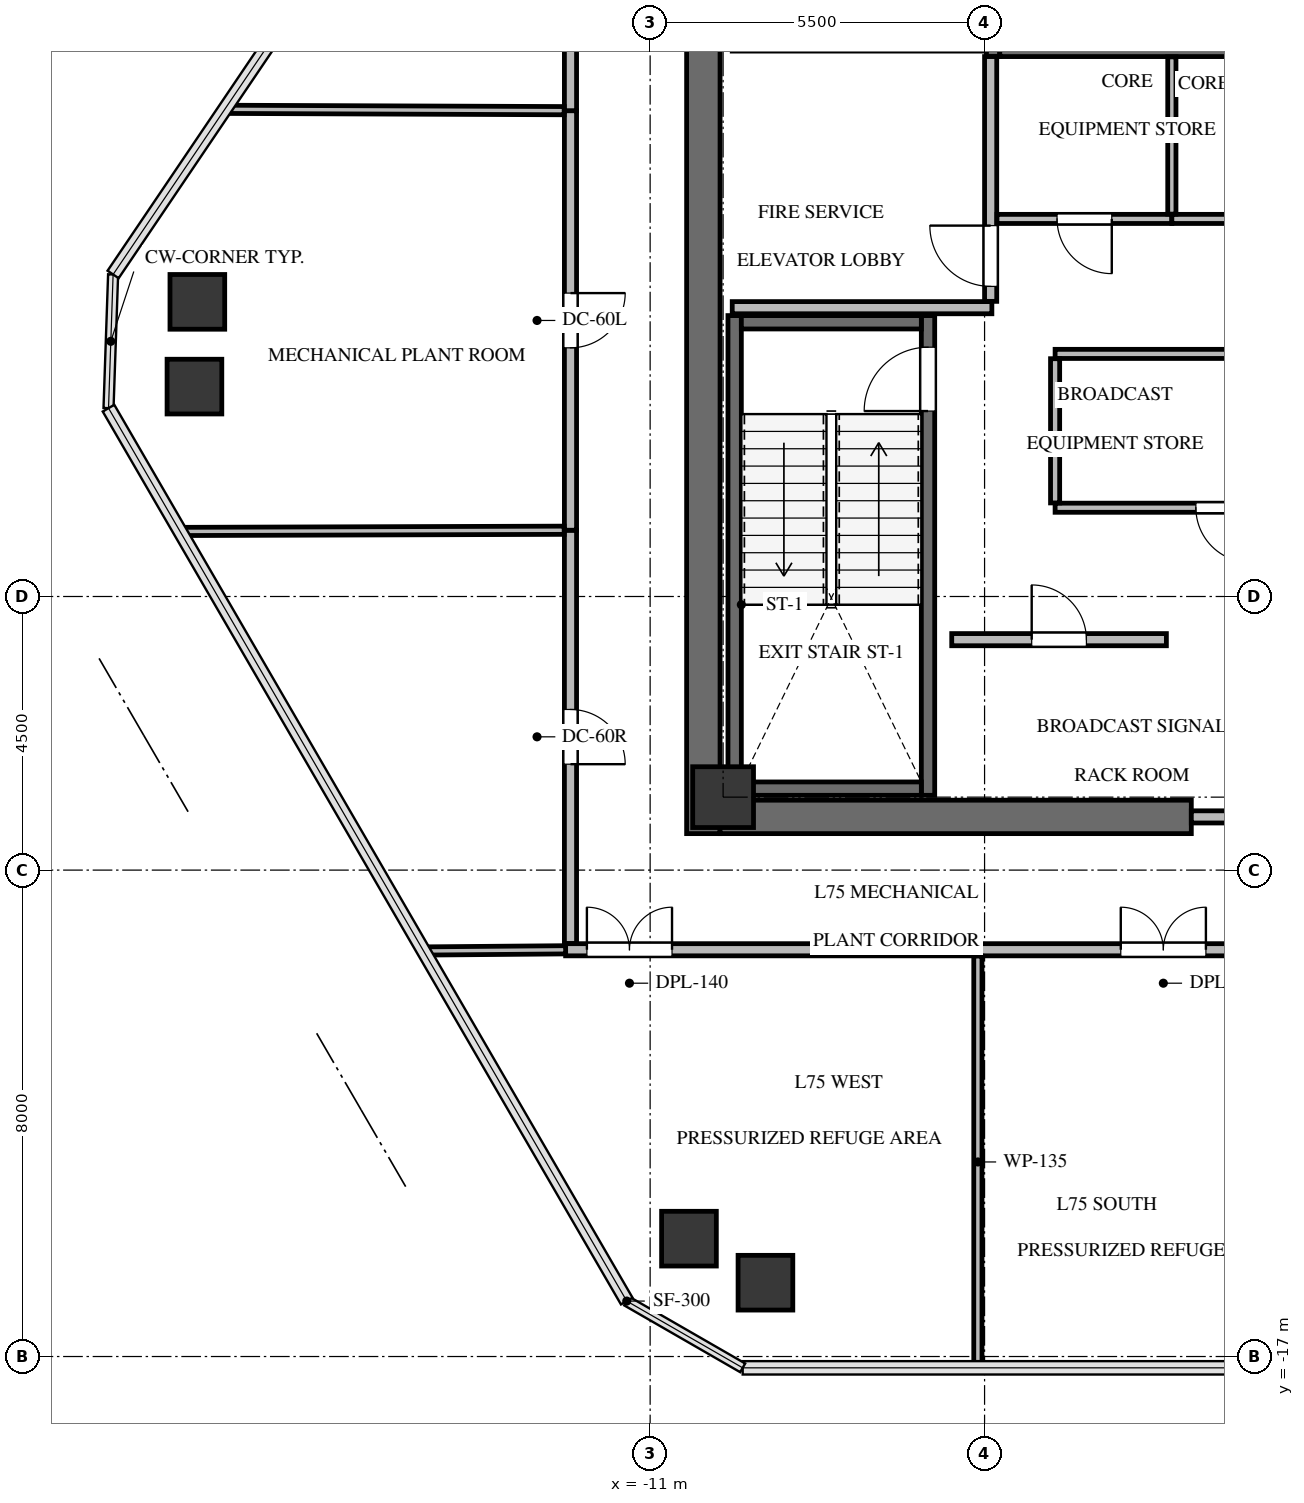
"""IFC4 building model, lengths in metres.
Left out: names, types, materials, properties, quantities, classifications, styles, units other than length and angle.
Written with IfcOpenShell. Run it as: python <this file> out.ifc"""

import sys

from ifc_helpers import new_model, si_unit, direction, frame, frame_2d, origin, origin_2d, place, context, subcontext, project, spatial, rectangle, extrude, source, transform, mapped, element, fill, save


model = new_model("IFC4")
c1 = context("Model", 3, precision=1e-05, world=origin(), true_north=direction((0.0, 1.0)))
c2 = subcontext(c1, "Body", "Model", "MODEL_VIEW")
j1 = project(units=[si_unit("LENGTHUNIT", "METRE"), si_unit("PLANEANGLEUNIT", "RADIAN")], contexts=[c1])
p1 = place(None, origin())
s1 = spatial("IfcSite", under=j1, at=p1, CompositionType="ELEMENT")
p2 = place(p1, origin())
s2 = spatial("IfcBuilding", under=s1, at=p2, CompositionType="ELEMENT")
p3 = place(p2, frame((0.0, 0.0, 268.3)))
s3 = spatial("IfcBuildingStorey", under=s2, at=p3, CompositionType="ELEMENT", Elevation=268.3)
p4 = place(p3, frame((-10.125, -8.4, 0.0), z_axis=(0.0, 0.0, 1.0), x_axis=(0.0, 1.0, 0.0)))
e1 = element("IfcWall", 1, at=p4, inside=s3, PredefinedType="SHEAR", context=c2, shape_type="SweptSolid", body=[
    extrude(rectangle(XDim=16.8, YDim=0.55, at=frame_2d((8.4, 0.0))), origin(), (0.0, 0.0, 1.0), 4.2),
])
p5 = place(p3, frame((-9.85, -8.125, 0.0), z_axis=(0.0, 0.0, 1.0), x_axis=(1.0, 0.0, 0.0)))
e2 = element("IfcWall", 2, at=p5, inside=s3, PredefinedType="SHEAR", context=c2, shape_type="SweptSolid", body=[
    extrude(rectangle(XDim=7.75, YDim=0.55, at=frame_2d((3.875, 0.0))), origin(), (0.0, 0.0, 1.0), 4.2),
])
p6 = place(p3, frame((-6.43, -7.77, -0.3), z_axis=(0.0, 0.0, 1.0), x_axis=(0.0, 1.0, 0.0)))
e3 = element("IfcWall", 3, at=p6, inside=s3, PredefinedType="SHEAR", context=c2, shape_type="SweptSolid", body=[
    extrude(rectangle(XDim=7.89, YDim=0.22, at=frame_2d((3.945, 0.0))), origin(), (0.0, 0.0, 1.0), 4.05),
])
p7 = place(p6, frame((6.32, 0.0, 0.0)))
e4 = element("IfcOpeningElement", 4, at=p7, cuts=e3, PredefinedType="OPENING", context=c2, shape_type="SweptSolid", body=[
    extrude(rectangle(XDim=1.05, YDim=2.15, at=frame_2d((0.525, 1.075))), frame((0.0, 0.12, 0.0), z_axis=(0.0, -1.0, 0.0), x_axis=(1.0, 0.0, 0.0)), (0.0, 0.0, 1.0), 0.24),
])
p8 = place(p3, frame((-9.61, 0.12, -0.3), z_axis=(0.0, 0.0, 1.0), x_axis=(0.0, -1.0, 0.0)))
e5 = element("IfcWall", 5, at=p8, inside=s3, PredefinedType="SHEAR", context=c2, shape_type="SweptSolid", body=[
    extrude(rectangle(XDim=7.89, YDim=0.22, at=frame_2d((3.945, 0.0))), origin(), (0.0, 0.0, 1.0), 4.05),
])
for number, where, z_axis, x_axis in (
    (6, (-9.5, -7.66, -0.3), (0.0, 0.0, 1.0), (1.0, 0.0, 0.0)),
    (7, (-6.54, 0.01, -0.3), (0.0, 0.0, 1.0), (-1.0, 0.0, 0.0)),
):
    element("IfcWall", number, at=place(p3, frame(where, z_axis=z_axis, x_axis=x_axis)), inside=s3, PredefinedType="SHEAR", context=c2, shape_type="SweptSolid", body=[
        extrude(rectangle(XDim=2.96, YDim=0.22, at=frame_2d((1.48, 0.0))), origin(), (0.0, 0.0, 1.0), 4.05),
    ])
p9 = place(p3, frame((-5.36, 7.78, -0.3), z_axis=(0.0, 0.0, 1.0), x_axis=(0.0, -1.0, 0.0)))
e8 = element("IfcWall", 8, at=p9, inside=s3, PredefinedType="SHEAR", context=c2, shape_type="SweptSolid", body=[
    extrude(rectangle(XDim=3.4, YDim=0.22, at=frame_2d((1.7, 0.0))), origin(), (0.0, 0.0, 1.0), 4.05),
])
p10 = place(p3, frame((-5.25, 4.49, -0.3), z_axis=(0.0, 0.0, 1.0), x_axis=(1.0, 0.0, 0.0)))
e9 = element("IfcWall", 9, at=p10, inside=s3, PredefinedType="SHEAR", context=c2, shape_type="SweptSolid", body=[
    extrude(rectangle(XDim=7.35, YDim=0.22, at=frame_2d((3.675, 0.0))), origin(), (0.0, 0.0, 1.0), 4.05),
])
p11 = place(p10, frame((5.85, 0.0, 0.0)))
e10 = element("IfcOpeningElement", 10, at=p11, cuts=e9, PredefinedType="OPENING", context=c2, shape_type="SweptSolid", body=[
    extrude(rectangle(XDim=1.05, YDim=2.15, at=frame_2d((0.525, 1.075))), frame((0.0, 0.12, 0.0), z_axis=(0.0, -1.0, 0.0), x_axis=(1.0, 0.0, 0.0)), (0.0, 0.0, 1.0), 0.24),
])
m1 = source(origin(), c2, "Body", "SweptSolid", [
    extrude(rectangle(XDim=1.0, YDim=1.0, at=origin_2d()), origin(), (0.0, 0.0, 1.0), 4.05),
])
p12 = place(p3, frame((-9.8, -7.8, -0.3), z_axis=(0.0, 0.0, 1.0), x_axis=(1.0, 0.0, 0.0)))
e11 = element("IfcColumn", 11, at=p12, inside=s3, PredefinedType="COLUMN", context=c2, shape_type="MappedRepresentation", body=[
    mapped(m1, transform((0.0, 0.0, 0.0), x_axis=(1.0, 0.0, 0.0), y_axis=(0.0, 1.0, 0.0), z_axis=(0.0, 0.0, 1.0), scale=1.0)),
])
m2 = source(origin(), c2, "Body", "SweptSolid", [
    extrude(rectangle(XDim=0.9, YDim=0.9, at=origin_2d()), origin(), (0.0, 0.0, 1.0), 4.05),
])
for number, where, z_axis, x_axis in (
    (12, (-10.361, -15.062, -0.3), (0.0, 0.0, 1.0), (1.0, 0.0, 0.0)),
    (13, (-18.494, -1.048, -0.3), (0.0, 0.0, 1.0), (1.0, 0.0, 0.0)),
    (14, (-18.446, 0.346, -0.3), (0.0, 0.0, 1.0), (1.0, 0.0, 0.0)),
    (15, (-9.104, -15.786, -0.3), (0.0, 0.0, 1.0), (1.0, 0.0, 0.0)),
):
    element("IfcColumn", number, at=place(p3, frame(where, z_axis=z_axis, x_axis=x_axis)), inside=s3, PredefinedType="COLUMN", context=c2, shape_type="MappedRepresentation", body=[
        mapped(m2, transform((0.0, 0.0, 0.0), x_axis=(1.0, 0.0, 0.0), y_axis=(0.0, 1.0, 0.0), z_axis=(0.0, 0.0, 1.0), scale=1.0)),
    ])
p13 = place(p3, frame((-2.1, -8.125, 0.0), z_axis=(0.0, 0.0, 1.0), x_axis=(1.0, 0.0, 0.0)))
e16 = element("IfcWall", 16, at=p13, inside=s3, PredefinedType="SOLIDWALL", context=c2, shape_type="SweptSolid", body=[
    extrude(rectangle(XDim=4.2, YDim=0.2, at=frame_2d((2.1, 0.0))), origin(), (0.0, 0.0, 1.0), 3.735),
])
p14 = place(p13, frame((1.2, 0.0, 0.0)))
e17 = element("IfcOpeningElement", 17, at=p14, cuts=e16, PredefinedType="OPENING", context=c2, shape_type="SweptSolid", body=[
    extrude(rectangle(XDim=1.8, YDim=2.15, at=frame_2d((0.9, 1.075))), frame((0.0, 0.11, 0.0), z_axis=(0.0, -1.0, 0.0), x_axis=(1.0, 0.0, 0.0)), (0.0, 0.0, 1.0), 0.22),
])
p15 = place(p3, frame((-9.65, 0.25, 0.0), z_axis=(0.0, 0.0, 1.0), x_axis=(1.0, 0.0, 0.0)))
e18 = element("IfcWall", 18, at=p15, inside=s3, PredefinedType="SOLIDWALL", context=c2, shape_type="SweptSolid", body=[
    extrude(rectangle(XDim=4.27, YDim=0.2, at=frame_2d((2.135, 0.0))), origin(), (0.0, 0.0, 1.0), 3.735),
])
p16 = place(p3, frame((-5.4, 0.354, 0.0), z_axis=(0.0, 0.0, 1.0), x_axis=(0.0, 1.0, 0.0)))
e19 = element("IfcWall", 19, at=p16, inside=s3, PredefinedType="SOLIDWALL", context=c2, shape_type="SweptSolid", body=[
    extrude(rectangle(XDim=4.026, YDim=0.2, at=frame_2d((2.013, 0.0))), origin(), (0.0, 0.0, 1.0), 3.735),
])
p17 = place(p16, frame((0.246, 0.0, 0.0)))
e20 = element("IfcOpeningElement", 20, at=p17, cuts=e19, PredefinedType="OPENING", context=c2, shape_type="SweptSolid", body=[
    extrude(rectangle(XDim=1.0, YDim=2.15, at=frame_2d((0.5, 1.075))), frame((0.0, 0.11, 0.0), z_axis=(0.0, -1.0, 0.0), x_axis=(1.0, 0.0, 0.0)), (0.0, 0.0, 1.0), 0.22),
])
p18 = place(p3, frame((-6.04, -5.21, 0.0), z_axis=(0.0, 0.0, 1.0), x_axis=(1.0, 0.0, 0.0)))
e21 = element("IfcWall", 21, at=p18, inside=s3, PredefinedType="SOLIDWALL", context=c2, shape_type="SweptSolid", body=[
    extrude(rectangle(XDim=3.53, YDim=0.2, at=frame_2d((1.765, 0.0))), origin(), (0.0, 0.0, 1.0), 3.735),
])
p19 = place(p18, frame((1.315, 0.0, 0.0)))
e22 = element("IfcOpeningElement", 22, at=p19, cuts=e21, PredefinedType="OPENING", context=c2, shape_type="SweptSolid", body=[
    extrude(rectangle(XDim=0.9, YDim=2.05, at=frame_2d((0.45, 1.025))), frame((0.0, 0.11, 0.0), z_axis=(0.0, -1.0, 0.0), x_axis=(1.0, 0.0, 0.0)), (0.0, 0.0, 1.0), 0.22),
])
p20 = place(p3, frame((1.19, -3.04, 0.0), z_axis=(0.0, 0.0, 1.0), x_axis=(-1.0, 0.0, 0.0)))
e23 = element("IfcWall", 23, at=p20, inside=s3, PredefinedType="PARTITIONING", context=c2, shape_type="SweptSolid", body=[
    extrude(rectangle(XDim=5.53, YDim=0.15, at=frame_2d((2.765, 0.0))), origin(), (0.0, 0.0, 1.0), 3.735),
])
p21 = place(p20, frame((2.315, 0.0, 0.0)))
e24 = element("IfcOpeningElement", 24, at=p21, cuts=e23, PredefinedType="OPENING", context=c2, shape_type="SweptSolid", body=[
    extrude(rectangle(XDim=0.9, YDim=2.05, at=frame_2d((0.45, 1.025))), frame((0.0, 0.085, 0.0), z_axis=(0.0, -1.0, 0.0), x_axis=(1.0, 0.0, 0.0)), (0.0, 0.0, 1.0), 0.17),
])
p22 = place(p3, frame((-4.34, -0.51, 0.0), z_axis=(0.0, 0.0, 1.0), x_axis=(1.0, 0.0, 0.0)))
e25 = element("IfcWall", 25, at=p22, inside=s3, PredefinedType="PARTITIONING", context=c2, shape_type="SweptSolid", body=[
    extrude(rectangle(XDim=5.53, YDim=0.15, at=frame_2d((2.765, 0.0))), origin(), (0.0, 0.0, 1.0), 3.735),
])
p23 = place(p3, frame((-4.34, -2.961, 0.0), z_axis=(0.0, 0.0, 1.0), x_axis=(0.0, 1.0, 0.0)))
e26 = element("IfcWall", 26, at=p23, inside=s3, PredefinedType="PARTITIONING", context=c2, shape_type="SweptSolid", body=[
    extrude(rectangle(XDim=2.372, YDim=0.15, at=frame_2d((1.186, 0.0))), origin(), (0.0, 0.0, 1.0), 3.735),
])
p24 = place(p3, frame((-2.42, 1.71, 0.0), z_axis=(0.0, 0.0, 1.0), x_axis=(-1.0, 0.0, 0.0)))
e27 = element("IfcWall", 27, at=p24, inside=s3, PredefinedType="PARTITIONING", context=c2, shape_type="SweptSolid", body=[
    extrude(rectangle(XDim=2.876, YDim=0.15, at=frame_2d((1.438, 0.0))), origin(), (0.0, 0.0, 1.0), 3.735),
])
p25 = place(p24, frame((0.988, 0.0, 0.0)))
e28 = element("IfcOpeningElement", 28, at=p25, cuts=e27, PredefinedType="OPENING", context=c2, shape_type="SweptSolid", body=[
    extrude(rectangle(XDim=0.9, YDim=2.05, at=frame_2d((0.45, 1.025))), frame((0.0, 0.085, 0.0), z_axis=(0.0, -1.0, 0.0), x_axis=(1.0, 0.0, 0.0)), (0.0, 0.0, 1.0), 0.17),
])
p26 = place(p3, frame((0.52, 1.71, 0.0), z_axis=(0.0, 0.0, 1.0), x_axis=(-1.0, 0.0, 0.0)))
e29 = element("IfcWall", 29, at=p26, inside=s3, PredefinedType="PARTITIONING", context=c2, shape_type="SweptSolid", body=[
    extrude(rectangle(XDim=2.94, YDim=0.15, at=frame_2d((1.47, 0.0))), origin(), (0.0, 0.0, 1.0), 3.735),
])
p27 = place(p26, frame((1.02, 0.0, 0.0)))
e30 = element("IfcOpeningElement", 30, at=p27, cuts=e29, PredefinedType="OPENING", context=c2, shape_type="SweptSolid", body=[
    extrude(rectangle(XDim=0.9, YDim=2.05, at=frame_2d((0.45, 1.025))), frame((0.0, 0.085, 0.0), z_axis=(0.0, -1.0, 0.0), x_axis=(1.0, 0.0, 0.0)), (0.0, 0.0, 1.0), 0.17),
])
p28 = place(p3, frame((-12.39, -10.31, 0.0), z_axis=(0.0, 0.0, 1.0), x_axis=(1.0, 0.0, 0.0)))
e31 = element("IfcWall", 31, at=p28, inside=s3, PredefinedType="SOLIDWALL", context=c2, shape_type="SweptSolid", body=[
    extrude(rectangle(XDim=6.78, YDim=0.2, at=frame_2d((3.39, 0.0))), origin(), (0.0, 0.0, 1.0), 3.093),
])
p29 = place(p28, frame((0.35, 0.0, 0.0)))
e32 = element("IfcOpeningElement", 32, at=p29, cuts=e31, PredefinedType="OPENING", context=c2, shape_type="SweptSolid", body=[
    extrude(rectangle(XDim=1.4, YDim=2.15, at=frame_2d((0.7, 1.075))), frame((0.0, 0.11, 0.0), z_axis=(0.0, -1.0, 0.0), x_axis=(1.0, 0.0, 0.0)), (0.0, 0.0, 1.0), 0.22),
])
p30 = place(p3, frame((-5.61, -10.31, 0.0), z_axis=(0.0, 0.0, 1.0), x_axis=(1.0, 0.0, 0.0)))
e33 = element("IfcWall", 33, at=p30, inside=s3, PredefinedType="SOLIDWALL", context=c2, shape_type="SweptSolid", body=[
    extrude(rectangle(XDim=6.1, YDim=0.2, at=frame_2d((3.05, 0.0))), origin(), (0.0, 0.0, 1.0), 2.32),
])
p31 = place(p30, frame((2.35, 0.0, 0.0)))
e34 = element("IfcOpeningElement", 34, at=p31, cuts=e33, PredefinedType="OPENING", context=c2, shape_type="SweptSolid", body=[
    extrude(rectangle(XDim=1.4, YDim=2.15, at=frame_2d((0.7, 1.075))), frame((0.0, 0.11, 0.0), z_axis=(0.0, -1.0, 0.0), x_axis=(1.0, 0.0, 0.0)), (0.0, 0.0, 1.0), 0.22),
])
p32 = place(p3, frame((-12.31, -3.41, 0.0), z_axis=(0.0, 0.0, 1.0), x_axis=(0.0, -1.0, 0.0)))
e35 = element("IfcWall", 35, at=p32, inside=s3, PredefinedType="SOLIDWALL", context=c2, shape_type="SweptSolid", body=[
    extrude(rectangle(XDim=6.796, YDim=0.2, at=frame_2d((3.398, 0.0))), origin(), (0.0, 0.0, 1.0), 3.093),
])
p33 = place(p32, frame((2.948, 0.0, 0.0)))
e36 = element("IfcOpeningElement", 36, at=p33, cuts=e35, PredefinedType="OPENING", context=c2, shape_type="SweptSolid", body=[
    extrude(rectangle(XDim=0.9, YDim=2.05, at=frame_2d((0.45, 1.025))), frame((0.0, 0.11, 0.0), z_axis=(0.0, -1.0, 0.0), x_axis=(1.0, 0.0, 0.0)), (0.0, 0.0, 1.0), 0.22),
])
p34 = place(p3, frame((-12.31, 3.49, 0.0), z_axis=(0.0, 0.0, 1.0), x_axis=(0.0, -1.0, 0.0)))
e37 = element("IfcWall", 37, at=p34, inside=s3, PredefinedType="SOLIDWALL", context=c2, shape_type="SweptSolid", body=[
    extrude(rectangle(XDim=6.9, YDim=0.2, at=frame_2d((3.45, 0.0))), origin(), (0.0, 0.0, 1.0), 3.093),
])
p35 = place(p34, frame((3.0, 0.0, 0.0)))
e38 = element("IfcOpeningElement", 38, at=p35, cuts=e37, PredefinedType="OPENING", context=c2, shape_type="SweptSolid", body=[
    extrude(rectangle(XDim=0.9, YDim=2.05, at=frame_2d((0.45, 1.025))), frame((0.0, 0.11, 0.0), z_axis=(0.0, -1.0, 0.0), x_axis=(1.0, 0.0, 0.0)), (0.0, 0.0, 1.0), 0.22),
])
p36 = place(p3, frame((-12.31, 10.206, 0.0), z_axis=(0.0, 0.0, 1.0), x_axis=(0.0, -1.0, 0.0)))
e39 = element("IfcWall", 39, at=p36, inside=s3, PredefinedType="SOLIDWALL", context=c2, shape_type="SweptSolid", body=[
    extrude(rectangle(XDim=6.716, YDim=0.2, at=frame_2d((3.358, 0.0))), origin(), (0.0, 0.0, 1.0), 2.32),
])
p37 = place(p36, frame((2.908, 0.0, 0.0)))
e40 = element("IfcOpeningElement", 40, at=p37, cuts=e39, PredefinedType="OPENING", context=c2, shape_type="SweptSolid", body=[
    extrude(rectangle(XDim=0.9, YDim=2.05, at=frame_2d((0.45, 1.025))), frame((0.0, 0.11, 0.0), z_axis=(0.0, -1.0, 0.0), x_axis=(1.0, 0.0, 0.0)), (0.0, 0.0, 1.0), 0.22),
])
p38 = place(p3, frame((-2.42, 4.375, 0.0), z_axis=(0.0, 0.0, 1.0), x_axis=(0.0, -1.0, 0.0)))
e41 = element("IfcWall", 41, at=p38, inside=s3, PredefinedType="PARTITIONING", context=c2, shape_type="SweptSolid", body=[
    extrude(rectangle(XDim=2.586, YDim=0.135, at=frame_2d((1.293, 0.0))), origin(), (0.0, 0.0, 1.0), 3.735),
])
p39 = place(p3, frame((-5.61, -10.414, 0.0), z_axis=(0.0, 0.0, 1.0), x_axis=(0.0, -1.0, 0.0)))
e42 = element("IfcWall", 42, at=p39, inside=s3, PredefinedType="PARTITIONING", context=c2, shape_type="SweptSolid", body=[
    extrude(rectangle(XDim=6.772, YDim=0.135, at=frame_2d((3.386, 0.0))), origin(), (0.0, 0.0, 1.0), 2.32),
])
p40 = place(p3, frame((-14.726, -10.33, 0.0), z_axis=(0.0, 0.0, 1.0), x_axis=(0.99996592241, 0.008255544766, 0.0)))
e43 = element("IfcWall", 43, at=p40, inside=s3, PredefinedType="PARTITIONING", context=c2, shape_type="SweptSolid", body=[
    extrude(rectangle(XDim=2.336, YDim=0.135, at=frame_2d((1.168, 0.0))), origin(), (0.0, 0.0, 1.0), 2.32),
])
p41 = place(p3, frame((-18.73, -3.43, 0.0), z_axis=(0.0, 0.0, 1.0), x_axis=(0.999995099089, 0.00313078243, 0.0)))
e44 = element("IfcWall", 44, at=p41, inside=s3, PredefinedType="PARTITIONING", context=c2, shape_type="SweptSolid", body=[
    extrude(rectangle(XDim=6.316, YDim=0.135, at=frame_2d((3.158, 0.0))), origin(), (0.0, 0.0, 1.0), 2.32),
])
p42 = place(p3, frame((-17.996, 3.512, 0.0), z_axis=(0.0, 0.0, 1.0), x_axis=(0.99999225143, -0.003936632956, 0.0)))
e45 = element("IfcWall", 45, at=p42, inside=s3, PredefinedType="PARTITIONING", context=c2, shape_type="SweptSolid", body=[
    extrude(rectangle(XDim=5.582, YDim=0.135, at=frame_2d((2.791, 0.0))), origin(), (0.0, 0.0, 1.0), 2.32),
])
m3 = source(origin(), c2, "Body", "SweptSolid", [
    extrude(rectangle(XDim=1.05, YDim=2.15, at=frame_2d((0.525, 1.075))), frame((0.0, 0.025, 0.0), z_axis=(0.0, -1.0, 0.0), x_axis=(1.0, 0.0, 0.0)), (0.0, 0.0, 1.0), 0.05),
])
p43 = place(p7, origin())
e46 = element("IfcDoor", 46, at=p43, inside=s3, OperationType="SINGLE_SWING_LEFT", PredefinedType="DOOR", context=c2, shape_type="MappedRepresentation", body=[
    mapped(m3, transform((0.0, 0.0, 0.0), x_axis=(1.0, 0.0, 0.0), y_axis=(0.0, 1.0, 0.0), z_axis=(0.0, 0.0, 1.0), scale=1.0)),
])
fill(e4, e46)
m4 = source(origin(), c2, "Body", "SweptSolid", [
    extrude(rectangle(XDim=1.0, YDim=2.15, at=frame_2d((0.5, 1.075))), frame((0.0, 0.025, 0.0), z_axis=(0.0, -1.0, 0.0), x_axis=(1.0, 0.0, 0.0)), (0.0, 0.0, 1.0), 0.05),
])
p44 = place(p17, origin())
e47 = element("IfcDoor", 47, at=p44, inside=s3, OperationType="SINGLE_SWING_RIGHT", PredefinedType="DOOR", context=c2, shape_type="MappedRepresentation", body=[
    mapped(m4, transform((0.0, 0.0, 0.0), x_axis=(1.0, 0.0, 0.0), y_axis=(0.0, 1.0, 0.0), z_axis=(0.0, 0.0, 1.0), scale=1.0)),
])
fill(e20, e47)
m5 = source(origin(), c2, "Body", "SweptSolid", [
    extrude(rectangle(XDim=0.9, YDim=2.05, at=frame_2d((0.45, 1.025))), frame((0.0, 0.025, 0.0), z_axis=(0.0, -1.0, 0.0), x_axis=(1.0, 0.0, 0.0)), (0.0, 0.0, 1.0), 0.05),
])
p45 = place(p19, origin())
e48 = element("IfcDoor", 48, at=p45, inside=s3, OperationType="SINGLE_SWING_LEFT", PredefinedType="DOOR", context=c2, shape_type="MappedRepresentation", body=[
    mapped(m5, transform((0.0, 0.0, 0.0), x_axis=(1.0, 0.0, 0.0), y_axis=(0.0, 1.0, 0.0), z_axis=(0.0, 0.0, 1.0), scale=1.0)),
])
fill(e22, e48)
p46 = place(p21, origin())
e49 = element("IfcDoor", 49, at=p46, inside=s3, OperationType="SINGLE_SWING_LEFT", PredefinedType="DOOR", context=c2, shape_type="MappedRepresentation", body=[
    mapped(m5, transform((0.0, 0.0, 0.0), x_axis=(1.0, 0.0, 0.0), y_axis=(0.0, 1.0, 0.0), z_axis=(0.0, 0.0, 1.0), scale=1.0)),
])
fill(e24, e49)
p47 = place(p25, origin())
e50 = element("IfcDoor", 50, at=p47, inside=s3, OperationType="SINGLE_SWING_LEFT", PredefinedType="DOOR", context=c2, shape_type="MappedRepresentation", body=[
    mapped(m5, transform((0.0, 0.0, 0.0), x_axis=(1.0, 0.0, 0.0), y_axis=(0.0, 1.0, 0.0), z_axis=(0.0, 0.0, 1.0), scale=1.0)),
])
fill(e28, e50)
m6 = source(origin(), c2, "Body", "SweptSolid", [
    extrude(rectangle(XDim=1.4, YDim=2.15, at=frame_2d((0.7, 1.075))), frame((0.0, 0.025, 0.0), z_axis=(0.0, -1.0, 0.0), x_axis=(1.0, 0.0, 0.0)), (0.0, 0.0, 1.0), 0.05),
])
p48 = place(p29, origin())
e51 = element("IfcDoor", 51, at=p48, inside=s3, OperationType="DOUBLE_DOOR_SINGLE_SWING", PredefinedType="DOOR", context=c2, shape_type="MappedRepresentation", body=[
    mapped(m6, transform((0.0, 0.0, 0.0), x_axis=(1.0, 0.0, 0.0), y_axis=(0.0, 1.0, 0.0), z_axis=(0.0, 0.0, 1.0), scale=1.0)),
])
fill(e32, e51)
p49 = place(p31, origin())
e52 = element("IfcDoor", 52, at=p49, inside=s3, OperationType="DOUBLE_DOOR_SINGLE_SWING", PredefinedType="DOOR", context=c2, shape_type="MappedRepresentation", body=[
    mapped(m6, transform((0.0, 0.0, 0.0), x_axis=(1.0, 0.0, 0.0), y_axis=(0.0, 1.0, 0.0), z_axis=(0.0, 0.0, 1.0), scale=1.0)),
])
fill(e34, e52)
m7 = source(origin(), c2, "Body", "SweptSolid", [
    extrude(rectangle(XDim=0.9, YDim=2.05, at=frame_2d((0.45, 1.025))), frame((0.0, 0.025, 0.0), z_axis=(0.0, -1.0, 0.0), x_axis=(1.0, 0.0, 0.0)), (0.0, 0.0, 1.0), 0.05),
])
p50 = place(p33, origin())
e53 = element("IfcDoor", 53, at=p50, inside=s3, OperationType="SINGLE_SWING_RIGHT", PredefinedType="DOOR", context=c2, shape_type="MappedRepresentation", body=[
    mapped(m7, transform((0.0, 0.0, 0.0), x_axis=(1.0, 0.0, 0.0), y_axis=(0.0, 1.0, 0.0), z_axis=(0.0, 0.0, 1.0), scale=1.0)),
])
fill(e36, e53)
p51 = place(p35, origin())
e54 = element("IfcDoor", 54, at=p51, inside=s3, OperationType="SINGLE_SWING_LEFT", PredefinedType="DOOR", context=c2, shape_type="MappedRepresentation", body=[
    mapped(m5, transform((0.0, 0.0, 0.0), x_axis=(1.0, 0.0, 0.0), y_axis=(0.0, 1.0, 0.0), z_axis=(0.0, 0.0, 1.0), scale=1.0)),
])
fill(e38, e54)
save(model, sys.argv[1])
